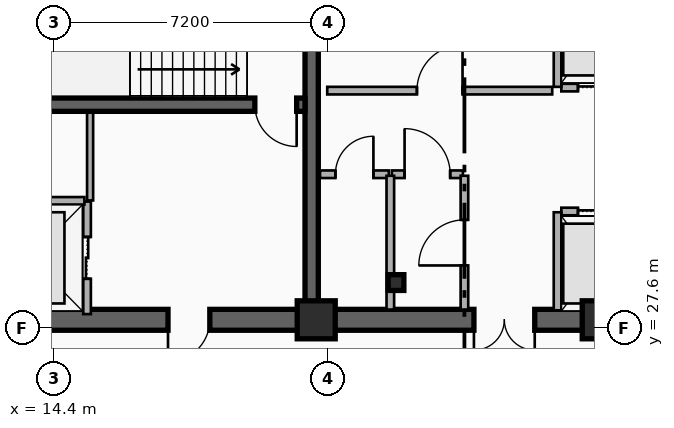
"""IFC4 building model, lengths in metres.
Left out: names, types, materials, properties, quantities, classifications, styles, units other than length and angle.
Written with IfcOpenShell. Run it as: python <this file> out.ifc"""

import sys

from ifc_helpers import new_model, si_unit, direction, frame, frame_2d, origin, origin_2d, place, context, subcontext, project, spatial, rectangle, i_section, extrude, element, fill, save


model = new_model("IFC4")
c1 = context("Model", 3, precision=1e-05, world=origin(), true_north=direction((0.0, 1.0)))
c2 = subcontext(c1, "Body", "Model", "MODEL_VIEW")
j1 = project(units=[si_unit("LENGTHUNIT", "METRE"), si_unit("PLANEANGLEUNIT", "RADIAN")], contexts=[c1])
p1 = place(None, origin())
s1 = spatial("IfcSite", under=j1, at=p1, CompositionType="ELEMENT")
p2 = place(p1, origin())
s2 = spatial("IfcBuilding", under=s1, at=p2, CompositionType="ELEMENT")
p3 = place(p2, frame((0.0, 0.0, 183.85)))
s3 = spatial("IfcBuildingStorey", under=s2, at=p3, CompositionType="ELEMENT", Elevation=183.85)
p4 = place(p3, frame((21.18, 27.82, 0.0), z_axis=(0.0, 0.0, 1.0), x_axis=(-1.0, 0.0, 0.0)))
e1 = element("IfcWall", 1, at=p4, inside=s3, PredefinedType="SHEAR", context=c2, shape_type="SweptSolid", body=[
    extrude(rectangle(XDim=9.03, YDim=0.55, at=frame_2d((4.515, 0.0))), origin(), (0.0, 0.0, 1.0), 4.55),
])
p5 = place(p4, frame((2.68, 0.0, 0.0)))
e2 = element("IfcOpeningElement", 2, at=p5, cuts=e1, PredefinedType="OPENING", context=c2, shape_type="SweptSolid", body=[
    extrude(rectangle(XDim=1.1, YDim=2.15, at=frame_2d((0.55, 1.075))), frame((0.0, 0.285, 0.0), z_axis=(0.0, -1.0, 0.0), x_axis=(1.0, 0.0, 0.0)), (0.0, 0.0, 1.0), 0.57),
])
p6 = place(p3, frame((33.15, 27.82, 0.0), z_axis=(0.0, 0.0, 1.0), x_axis=(-1.0, 0.0, 0.0)))
e3 = element("IfcWall", 3, at=p6, inside=s3, PredefinedType="SHEAR", context=c2, shape_type="SweptSolid", body=[
    extrude(rectangle(XDim=11.97, YDim=0.55, at=frame_2d((5.985, 0.0))), origin(), (0.0, 0.0, 1.0), 4.55),
])
p7 = place(p6, frame((6.1, 0.0, 0.0)))
e4 = element("IfcOpeningElement", 4, at=p7, cuts=e3, PredefinedType="OPENING", context=c2, shape_type="SweptSolid", body=[
    extrude(rectangle(XDim=1.6, YDim=2.2, at=frame_2d((0.8, 1.1))), frame((0.0, 0.285, 0.0), z_axis=(0.0, -1.0, 0.0), x_axis=(1.0, 0.0, 0.0)), (0.0, 0.0, 1.0), 0.57),
])
p8 = place(p3, frame((21.18, 28.095, 0.0), z_axis=(0.0, 0.0, 1.0), x_axis=(0.0, 1.0, 0.0)))
e5 = element("IfcWall", 5, at=p8, inside=s3, PredefinedType="SHEAR", context=c2, shape_type="SweptSolid", body=[
    extrude(rectangle(XDim=8.68, YDim=0.35, at=frame_2d((4.34, 0.0))), origin(), (0.0, 0.0, 1.0), 4.55),
])
p9 = place(p3, frame((21.005, 33.48, 0.0), z_axis=(0.0, 0.0, 1.0), x_axis=(-1.0, 0.0, 0.0)))
e6 = element("IfcWall", 6, at=p9, inside=s3, PredefinedType="SHEAR", context=c2, shape_type="SweptSolid", body=[
    extrude(rectangle(XDim=8.58, YDim=0.35, at=frame_2d((4.29, 0.0))), origin(), (0.0, 0.0, 1.0), 4.55),
])
p10 = place(p9, frame((0.22, 0.0, 0.0)))
e7 = element("IfcOpeningElement", 7, at=p10, cuts=e6, PredefinedType="OPENING", context=c2, shape_type="SweptSolid", body=[
    extrude(rectangle(XDim=1.1, YDim=2.15, at=frame_2d((0.55, 1.075))), frame((0.0, 0.185, 0.0), z_axis=(0.0, -1.0, 0.0), x_axis=(1.0, 0.0, 0.0)), (0.0, 0.0, 1.0), 0.37),
])
p11 = place(p3, frame((23.4, 28.8, 0.0), z_axis=(0.0, 0.0, 1.0), x_axis=(1.0, 0.0, 0.0)))
e8 = element("IfcColumn", 8, at=p11, inside=s3, PredefinedType="COLUMN", context=c2, shape_type="SweptSolid", body=[
    extrude(i_section(OverallWidth=0.413, OverallDepth=0.415, WebThickness=0.03, FlangeThickness=0.047, FilletRadius=0.015, at=origin_2d()), origin(), (0.0, 0.0, 1.0), 4.55),
])
for number, where, z_axis, x_axis in (
    (9, (21.3, 27.82, 0.0), (0.0, 0.0, 1.0), (1.0, 0.0, 0.0)),
    (10, (28.8, 27.82, 0.0), (0.0, 0.0, 1.0), (1.0, 0.0, 0.0)),
):
    element("IfcColumn", number, at=place(p3, frame(where, z_axis=z_axis, x_axis=x_axis)), inside=s3, PredefinedType="COLUMN", context=c2, shape_type="SweptSolid", body=[
        extrude(rectangle(XDim=1.0, YDim=1.0, at=origin_2d()), origin(), (0.0, 0.0, 1.0), 4.55),
    ])
p12 = place(p3, frame((15.27, 27.97, 0.0), z_axis=(0.0, 0.0, 1.0), x_axis=(0.0, 1.0, 0.0)))
e11 = element("IfcWall", 11, at=p12, inside=s3, PredefinedType="PARTITIONING", context=c2, shape_type="SweptSolid", body=[
    extrude(rectangle(XDim=2.96, YDim=0.2, at=frame_2d((1.48, 0.0))), origin(), (0.0, 0.0, 1.0), 3.3),
])
p13 = place(p12, frame((0.93, 0.0, 0.0)))
e12 = element("IfcOpeningElement", 12, at=p13, cuts=e11, PredefinedType="OPENING", context=c2, shape_type="SweptSolid", body=[
    extrude(rectangle(XDim=1.1, YDim=2.15, at=frame_2d((0.55, 1.075))), frame((0.0, 0.11, 0.0), z_axis=(0.0, -1.0, 0.0), x_axis=(1.0, 0.0, 0.0)), (0.0, 0.0, 1.0), 0.22),
])
p14 = place(p3, frame((12.45, 30.95, 0.0), z_axis=(0.0, 0.0, 1.0), x_axis=(1.0, 0.0, 0.0)))
e13 = element("IfcWall", 13, at=p14, inside=s3, PredefinedType="PARTITIONING", context=c2, shape_type="SweptSolid", body=[
    extrude(rectangle(XDim=2.75, YDim=0.2, at=frame_2d((1.375, 0.0))), origin(), (0.0, 0.0, 1.0), 3.3),
])
p15 = place(p3, frame((27.75, 30.67, 0.0), z_axis=(0.0, 0.0, 1.0), x_axis=(1.0, 0.0, 0.0)))
e14 = element("IfcWall", 14, at=p15, inside=s3, PredefinedType="PARTITIONING", context=c2, shape_type="SweptSolid", body=[
    extrude(rectangle(XDim=1.975, YDim=0.2, at=frame_2d((0.988, 0.0))), origin(), (0.0, 0.0, 1.0), 3.3),
])
p16 = place(p15, frame((0.438, 0.0, 0.0)))
e15 = element("IfcOpeningElement", 15, at=p16, cuts=e14, PredefinedType="OPENING", context=c2, shape_type="SweptSolid", body=[
    extrude(rectangle(XDim=1.1, YDim=2.15, at=frame_2d((0.55, 1.075))), frame((0.0, 0.11, 0.0), z_axis=(0.0, -1.0, 0.0), x_axis=(1.0, 0.0, 0.0)), (0.0, 0.0, 1.0), 0.22),
])
p17 = place(p3, frame((27.65, 28.07, 0.0), z_axis=(0.0, 0.0, 1.0), x_axis=(0.0, 1.0, 0.0)))
e16 = element("IfcWall", 16, at=p17, inside=s3, PredefinedType="PARTITIONING", context=c2, shape_type="SweptSolid", body=[
    extrude(rectangle(XDim=2.58, YDim=0.2, at=frame_2d((1.29, 0.0))), origin(), (0.0, 0.0, 1.0), 3.3),
])
p18 = place(p3, frame((27.75, 33.93, 0.0), z_axis=(0.0, 0.0, 1.0), x_axis=(1.0, 0.0, 0.0)))
e17 = element("IfcWall", 17, at=p18, inside=s3, PredefinedType="PARTITIONING", context=c2, shape_type="SweptSolid", body=[
    extrude(rectangle(XDim=1.975, YDim=0.2, at=frame_2d((0.988, 0.0))), origin(), (0.0, 0.0, 1.0), 3.3),
])
p19 = place(p18, frame((0.438, 0.0, 0.0)))
e18 = element("IfcOpeningElement", 18, at=p19, cuts=e17, PredefinedType="OPENING", context=c2, shape_type="SweptSolid", body=[
    extrude(rectangle(XDim=1.1, YDim=2.15, at=frame_2d((0.55, 1.075))), frame((0.0, 0.11, 0.0), z_axis=(0.0, -1.0, 0.0), x_axis=(1.0, 0.0, 0.0)), (0.0, 0.0, 1.0), 0.22),
])
p20 = place(p3, frame((27.65, 33.95, 0.0), z_axis=(0.0, 0.0, 1.0), x_axis=(0.0, 1.0, 0.0)))
e19 = element("IfcWall", 19, at=p20, inside=s3, PredefinedType="PARTITIONING", context=c2, shape_type="SweptSolid", body=[
    extrude(rectangle(XDim=2.68, YDim=0.2, at=frame_2d((1.34, 0.0))), origin(), (0.0, 0.0, 1.0), 3.3),
])
p21 = place(p3, frame((21.4, 31.65, 0.0), z_axis=(0.0, 0.0, 1.0), x_axis=(1.0, 0.0, 0.0)))
e20 = element("IfcWall", 20, at=p21, inside=s3, PredefinedType="PARTITIONING", context=c2, shape_type="SweptSolid", body=[
    extrude(rectangle(XDim=1.81, YDim=0.2, at=frame_2d((0.905, 0.0))), origin(), (0.0, 0.0, 1.0), 3.3),
])
p22 = place(p21, frame((0.405, 0.0, 0.0)))
e21 = element("IfcOpeningElement", 21, at=p22, cuts=e20, PredefinedType="OPENING", context=c2, shape_type="SweptSolid", body=[
    extrude(rectangle(XDim=1.0, YDim=2.15, at=frame_2d((0.5, 1.075))), frame((0.0, 0.11, 0.0), z_axis=(0.0, -1.0, 0.0), x_axis=(1.0, 0.0, 0.0)), (0.0, 0.0, 1.0), 0.22),
])
p23 = place(p3, frame((23.29, 31.65, 0.0), z_axis=(0.0, 0.0, 1.0), x_axis=(1.0, 0.0, 0.0)))
e22 = element("IfcWall", 22, at=p23, inside=s3, PredefinedType="PARTITIONING", context=c2, shape_type="SweptSolid", body=[
    extrude(rectangle(XDim=1.87, YDim=0.2, at=frame_2d((0.935, 0.0))), origin(), (0.0, 0.0, 1.0), 4.23),
])
p24 = place(p23, frame((0.335, 0.0, 0.0)))
e23 = element("IfcOpeningElement", 23, at=p24, cuts=e22, PredefinedType="OPENING", context=c2, shape_type="SweptSolid", body=[
    extrude(rectangle(XDim=1.2, YDim=2.15, at=frame_2d((0.6, 1.075))), frame((0.0, 0.11, 0.0), z_axis=(0.0, -1.0, 0.0), x_axis=(1.0, 0.0, 0.0)), (0.0, 0.0, 1.0), 0.22),
])
p25 = place(p3, frame((21.59, 33.85, 0.0), z_axis=(0.0, 0.0, 1.0), x_axis=(1.0, 0.0, 0.0)))
e24 = element("IfcWall", 24, at=p25, inside=s3, PredefinedType="PARTITIONING", context=c2, shape_type="SweptSolid", body=[
    extrude(rectangle(XDim=5.92, YDim=0.2, at=frame_2d((2.96, 0.0))), origin(), (0.0, 0.0, 1.0), 3.3),
])
p26 = place(p25, frame((2.36, 0.0, 0.0)))
e25 = element("IfcOpeningElement", 25, at=p26, cuts=e24, PredefinedType="OPENING", context=c2, shape_type="SweptSolid", body=[
    extrude(rectangle(XDim=1.2, YDim=2.15, at=frame_2d((0.6, 1.075))), frame((0.0, 0.11, 0.0), z_axis=(0.0, -1.0, 0.0), x_axis=(1.0, 0.0, 0.0)), (0.0, 0.0, 1.0), 0.22),
])
p27 = place(p3, frame((25.2, 28.09, 0.0), z_axis=(0.0, 0.0, 1.0), x_axis=(0.0, 1.0, 0.0)))
e26 = element("IfcWall", 26, at=p27, inside=s3, PredefinedType="PARTITIONING", context=c2, shape_type="SweptSolid", body=[
    extrude(rectangle(XDim=3.52, YDim=0.2, at=frame_2d((1.76, 0.0))), origin(), (0.0, 0.0, 1.0), 3.61),
])
p28 = place(p27, frame((1.16, 0.0, 0.0)))
e27 = element("IfcOpeningElement", 27, at=p28, cuts=e26, PredefinedType="OPENING", context=c2, shape_type="SweptSolid", body=[
    extrude(rectangle(XDim=1.2, YDim=2.15, at=frame_2d((0.6, 1.075))), frame((0.0, 0.11, 0.0), z_axis=(0.0, -1.0, 0.0), x_axis=(1.0, 0.0, 0.0)), (0.0, 0.0, 1.0), 0.22),
])
p29 = place(p3, frame((23.25, 28.09, 0.0), z_axis=(0.0, 0.0, 1.0), x_axis=(0.0, 1.0, 0.0)))
e28 = element("IfcWall", 28, at=p29, inside=s3, PredefinedType="PARTITIONING", context=c2, shape_type="SweptSolid", body=[
    extrude(rectangle(XDim=3.52, YDim=0.2, at=frame_2d((1.76, 0.0))), origin(), (0.0, 0.0, 1.0), 3.61),
])
p30 = place(p3, frame((15.35, 30.96, 0.0), z_axis=(0.0, 0.0, 1.0), x_axis=(0.0, 1.0, 0.0)))
e29 = element("IfcWall", 29, at=p30, inside=s3, PredefinedType="PARTITIONING", context=c2, shape_type="SweptSolid", body=[
    extrude(rectangle(XDim=2.31, YDim=0.16, at=frame_2d((1.155, 0.0))), origin(), (0.0, 0.0, 1.0), 4.23),
])
p31 = place(p13, origin())
e30 = element("IfcDoor", 30, at=p31, inside=s3, OperationType="DOUBLE_DOOR_SLIDING", PredefinedType="DOOR", context=c2, shape_type="SweptSolid", body=[
    extrude(rectangle(XDim=1.1, YDim=2.15, at=frame_2d((0.55, 1.075))), frame((0.0, 0.025, 0.0), z_axis=(0.0, -1.0, 0.0), x_axis=(1.0, 0.0, 0.0)), (0.0, 0.0, 1.0), 0.05),
])
fill(e12, e30)
p32 = place(p16, origin())
e31 = element("IfcDoor", 31, at=p32, inside=s3, OperationType="DOUBLE_DOOR_SLIDING", PredefinedType="DOOR", context=c2, shape_type="SweptSolid", body=[
    extrude(rectangle(XDim=1.1, YDim=2.15, at=frame_2d((0.55, 1.075))), frame((0.0, 0.025, 0.0), z_axis=(0.0, -1.0, 0.0), x_axis=(1.0, 0.0, 0.0)), (0.0, 0.0, 1.0), 0.05),
])
fill(e15, e31)
p33 = place(p19, origin())
e32 = element("IfcDoor", 32, at=p33, inside=s3, OperationType="DOUBLE_DOOR_SLIDING", PredefinedType="DOOR", context=c2, shape_type="SweptSolid", body=[
    extrude(rectangle(XDim=1.1, YDim=2.15, at=frame_2d((0.55, 1.075))), frame((0.0, 0.025, 0.0), z_axis=(0.0, -1.0, 0.0), x_axis=(1.0, 0.0, 0.0)), (0.0, 0.0, 1.0), 0.05),
])
fill(e18, e32)
p34 = place(p10, origin())
e33 = element("IfcDoor", 33, at=p34, inside=s3, OperationType="SINGLE_SWING_LEFT", PredefinedType="DOOR", context=c2, shape_type="SweptSolid", body=[
    extrude(rectangle(XDim=1.1, YDim=2.15, at=frame_2d((0.55, 1.075))), frame((0.0, 0.025, 0.0), z_axis=(0.0, -1.0, 0.0), x_axis=(1.0, 0.0, 0.0)), (0.0, 0.0, 1.0), 0.05),
])
fill(e7, e33)
p35 = place(p5, origin())
e34 = element("IfcDoor", 34, at=p35, inside=s3, OperationType="SINGLE_SWING_RIGHT", PredefinedType="DOOR", context=c2, shape_type="SweptSolid", body=[
    extrude(rectangle(XDim=1.1, YDim=2.15, at=frame_2d((0.55, 1.075))), frame((0.0, 0.025, 0.0), z_axis=(0.0, -1.0, 0.0), x_axis=(1.0, 0.0, 0.0)), (0.0, 0.0, 1.0), 0.05),
])
fill(e2, e34)
p36 = place(p7, origin())
e35 = element("IfcDoor", 35, at=p36, inside=s3, OperationType="SINGLE_SWING_LEFT", PredefinedType="DOOR", context=c2, shape_type="SweptSolid", body=[
    extrude(rectangle(XDim=1.6, YDim=2.2, at=frame_2d((0.8, 1.1))), frame((0.0, 0.025, 0.0), z_axis=(0.0, -1.0, 0.0), x_axis=(1.0, 0.0, 0.0)), (0.0, 0.0, 1.0), 0.05),
])
fill(e4, e35)
p37 = place(p22, origin())
e36 = element("IfcDoor", 36, at=p37, inside=s3, OperationType="SINGLE_SWING_RIGHT", PredefinedType="DOOR", context=c2, shape_type="SweptSolid", body=[
    extrude(rectangle(XDim=1.0, YDim=2.15, at=frame_2d((0.5, 1.075))), frame((0.0, 0.025, 0.0), z_axis=(0.0, -1.0, 0.0), x_axis=(1.0, 0.0, 0.0)), (0.0, 0.0, 1.0), 0.05),
])
fill(e21, e36)
p38 = place(p24, origin())
e37 = element("IfcDoor", 37, at=p38, inside=s3, OperationType="SINGLE_SWING_LEFT", PredefinedType="DOOR", context=c2, shape_type="SweptSolid", body=[
    extrude(rectangle(XDim=1.2, YDim=2.15, at=frame_2d((0.6, 1.075))), frame((0.0, 0.025, 0.0), z_axis=(0.0, -1.0, 0.0), x_axis=(1.0, 0.0, 0.0)), (0.0, 0.0, 1.0), 0.05),
])
fill(e23, e37)
p39 = place(p26, origin())
e38 = element("IfcDoor", 38, at=p39, inside=s3, OperationType="SINGLE_SWING_RIGHT", PredefinedType="DOOR", context=c2, shape_type="SweptSolid", body=[
    extrude(rectangle(XDim=1.2, YDim=2.15, at=frame_2d((0.6, 1.075))), frame((0.0, 0.025, 0.0), z_axis=(0.0, -1.0, 0.0), x_axis=(1.0, 0.0, 0.0)), (0.0, 0.0, 1.0), 0.05),
])
fill(e25, e38)
p40 = place(p28, origin())
e39 = element("IfcDoor", 39, at=p40, inside=s3, OperationType="SINGLE_SWING_LEFT", PredefinedType="DOOR", context=c2, shape_type="SweptSolid", body=[
    extrude(rectangle(XDim=1.2, YDim=2.15, at=frame_2d((0.6, 1.075))), frame((0.0, 0.025, 0.0), z_axis=(0.0, -1.0, 0.0), x_axis=(1.0, 0.0, 0.0)), (0.0, 0.0, 1.0), 0.05),
])
fill(e27, e39)
save(model, sys.argv[1])
